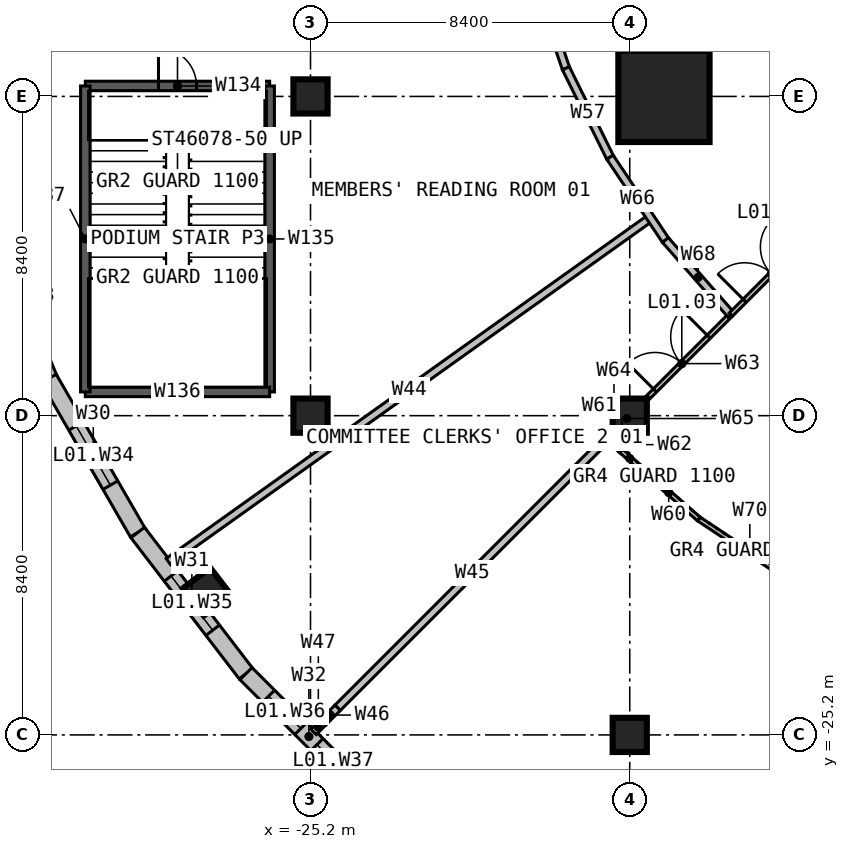
"""IFC4 building model, lengths in metres.
Left out: names, types, materials, properties, quantities, classifications, styles, units other than length and angle.
Written with IfcOpenShell. Run it as: python <this file> out.ifc"""

import sys

from ifc_helpers import new_model, si_unit, direction, frame, frame_2d, origin, origin_2d, place, context, subcontext, project, spatial, rectangle, extrude, element, fill, save


model = new_model("IFC4")
c1 = context("Model", 3, precision=1e-05, world=origin(), true_north=direction((0.0, 1.0)))
c2 = subcontext(c1, "Body", "Model", "MODEL_VIEW")
j1 = project(units=[si_unit("LENGTHUNIT", "METRE"), si_unit("PLANEANGLEUNIT", "RADIAN")], contexts=[c1])
p1 = place(None, origin())
s1 = spatial("IfcSite", under=j1, at=p1, CompositionType="ELEMENT")
p2 = place(p1, origin())
s2 = spatial("IfcBuilding", under=s1, at=p2, CompositionType="ELEMENT")
p3 = place(p2, frame((0.0, 0.0, 6.0)))
s3 = spatial("IfcBuildingStorey", under=s2, at=p3, CompositionType="ELEMENT", Elevation=6.0)
for number, where, z_axis, x_axis in (
    (1, (-25.2, -16.8, 0.0), (0.0, 0.0, 1.0), (1.0, 0.0, 0.0)),
    (2, (-25.2, -8.4, 0.0), (0.0, 0.0, 1.0), (1.0, 0.0, 0.0)),
    (3, (-16.8, -25.2, 0.0), (0.0, 0.0, 1.0), (1.0, 0.0, 0.0)),
    (4, (-16.8, -16.8, 0.0), (0.0, 0.0, 1.0), (1.0, 0.0, 0.0)),
):
    element("IfcColumn", number, at=place(p3, frame(where, z_axis=z_axis, x_axis=x_axis)), inside=s3, PredefinedType="COLUMN", context=c2, shape_type="SweptSolid", body=[
        extrude(rectangle(XDim=0.9, YDim=0.9, at=origin_2d()), origin(), (0.0, 0.0, 1.0), 5.0),
    ])
p4 = place(p3, frame((-15.9, -8.4, 0.0), z_axis=(0.0, 0.0, 1.0), x_axis=(1.0, 0.0, 0.0)))
e5 = element("IfcColumn", 5, at=p4, inside=s3, PredefinedType="COLUMN", context=c2, shape_type="SweptSolid", body=[
    extrude(rectangle(XDim=2.4, YDim=2.4, at=origin_2d()), origin(), (0.0, 0.0, 1.0), 5.0),
])
for number, where, z_axis, x_axis in (
    (6, (-32.521, -13.47, 0.0), (0.0, 0.0, 1.0), (-0.924, -0.383, 0.0)),
    (7, (-27.926, -21.428, 0.0), (0.0, 0.0, 1.0), (-0.793, -0.609, 0.0)),
):
    element("IfcColumn", number, at=place(p3, frame(where, z_axis=z_axis, x_axis=x_axis)), inside=s3, PredefinedType="COLUMN", context=c2, shape_type="SweptSolid", body=[
        extrude(rectangle(XDim=0.9, YDim=0.9, at=origin_2d()), origin(), (0.0, 0.0, 1.0), 5.0),
    ])
p5 = place(p3, frame((-33.876, -11.5, 0.0), z_axis=(0.0, 0.0, 1.0), x_axis=(0.382669718086, -0.923885213032, 0.0)))
e8 = element("IfcWall", 8, at=p5, inside=s3, PredefinedType="SOLIDWALL", context=c2, shape_type="SweptSolid", body=[
    extrude(rectangle(XDim=4.68, YDim=0.45, at=frame_2d((2.34, 0.0))), origin(), (0.0, 0.0, 1.0), 4.7),
])
p6 = place(p5, frame((1.44, 0.0, 0.9)))
e9 = element("IfcOpeningElement", 9, at=p6, cuts=e8, PredefinedType="OPENING", context=c2, shape_type="SweptSolid", body=[
    extrude(rectangle(XDim=1.8, YDim=2.4, at=frame_2d((0.9, 1.2))), frame((0.0, 0.235, 0.0), z_axis=(0.0, -1.0, 0.0), x_axis=(1.0, 0.0, 0.0)), (0.0, 0.0, 1.0), 0.47),
])
p7 = place(p3, frame((-32.086, -15.823, 0.0), z_axis=(0.0, 0.0, 1.0), x_axis=(0.500022025083, -0.866012687223, 0.0)))
e10 = element("IfcWall", 10, at=p7, inside=s3, PredefinedType="SOLIDWALL", context=c2, shape_type="SweptSolid", body=[
    extrude(rectangle(XDim=4.679, YDim=0.45, at=frame_2d((2.34, 0.0))), origin(), (0.0, 0.0, 1.0), 4.7),
])
p8 = place(p7, frame((1.44, 0.0, 0.9)))
e11 = element("IfcOpeningElement", 11, at=p8, cuts=e10, PredefinedType="OPENING", context=c2, shape_type="SweptSolid", body=[
    extrude(rectangle(XDim=1.8, YDim=2.4, at=frame_2d((0.9, 1.2))), frame((0.0, 0.235, 0.0), z_axis=(0.0, -1.0, 0.0), x_axis=(1.0, 0.0, 0.0)), (0.0, 0.0, 1.0), 0.47),
])
p9 = place(p3, frame((-29.746, -19.875, 0.0), z_axis=(0.0, 0.0, 1.0), x_axis=(0.608769916927, -0.79334682721, 0.0)))
e12 = element("IfcWall", 12, at=p9, inside=s3, PredefinedType="SOLIDWALL", context=c2, shape_type="SweptSolid", body=[
    extrude(rectangle(XDim=4.68, YDim=0.45, at=frame_2d((2.34, 0.0))), origin(), (0.0, 0.0, 1.0), 4.7),
])
p10 = place(p9, frame((1.44, 0.0, 0.9)))
e13 = element("IfcOpeningElement", 13, at=p10, cuts=e12, PredefinedType="OPENING", context=c2, shape_type="SweptSolid", body=[
    extrude(rectangle(XDim=1.8, YDim=2.4, at=frame_2d((0.9, 1.2))), frame((0.0, 0.235, 0.0), z_axis=(0.0, -1.0, 0.0), x_axis=(1.0, 0.0, 0.0)), (0.0, 0.0, 1.0), 0.47),
])
p11 = place(p3, frame((-26.897, -23.588, 0.0), z_axis=(0.0, 0.0, 1.0), x_axis=(0.707106781187, -0.707106781187, 0.0)))
e14 = element("IfcWall", 14, at=p11, inside=s3, PredefinedType="SOLIDWALL", context=c2, shape_type="SweptSolid", body=[
    extrude(rectangle(XDim=4.679, YDim=0.45, at=frame_2d((2.34, 0.0))), origin(), (0.0, 0.0, 1.0), 4.7),
])
p12 = place(p11, frame((0.84, 0.0, 0.9)))
e15 = element("IfcOpeningElement", 15, at=p12, cuts=e14, PredefinedType="OPENING", context=c2, shape_type="SweptSolid", body=[
    extrude(rectangle(XDim=1.2, YDim=2.4, at=frame_2d((0.6, 1.2))), frame((0.0, 0.235, 0.0), z_axis=(0.0, -1.0, 0.0), x_axis=(1.0, 0.0, 0.0)), (0.0, 0.0, 1.0), 0.47),
])
p13 = place(p11, frame((2.64, 0.0, 0.9)))
e16 = element("IfcOpeningElement", 16, at=p13, cuts=e14, PredefinedType="OPENING", context=c2, shape_type="SweptSolid", body=[
    extrude(rectangle(XDim=1.2, YDim=2.4, at=frame_2d((0.6, 1.2))), frame((0.0, 0.235, 0.0), z_axis=(0.0, -1.0, 0.0), x_axis=(1.0, 0.0, 0.0)), (0.0, 0.0, 1.0), 0.47),
])
p14 = place(p3, frame((-31.125, -8.125, 0.0), z_axis=(0.0, 0.0, 1.0), x_axis=(1.0, 0.0, 0.0)))
e17 = element("IfcWall", 17, at=p14, inside=s3, PredefinedType="SOLIDWALL", context=c2, shape_type="SweptSolid", body=[
    extrude(rectangle(XDim=4.85, YDim=0.25, at=frame_2d((2.425, 0.0))), origin(), (0.0, 0.0, 1.0), 5.0),
])
p15 = place(p14, frame((1.925, 0.0, 0.0)))
e18 = element("IfcOpeningElement", 18, at=p15, cuts=e17, PredefinedType="OPENING", context=c2, shape_type="SweptSolid", body=[
    extrude(rectangle(XDim=1.0, YDim=2.2, at=frame_2d((0.5, 1.1))), frame((0.0, 0.135, 0.0), z_axis=(0.0, -1.0, 0.0), x_axis=(1.0, 0.0, 0.0)), (0.0, 0.0, 1.0), 0.27),
])
p16 = place(p3, frame((-26.275, -8.125, 0.0), z_axis=(0.0, 0.0, 1.0), x_axis=(0.0, -1.0, 0.0)))
e19 = element("IfcWall", 19, at=p16, inside=s3, PredefinedType="SOLIDWALL", context=c2, shape_type="SweptSolid", body=[
    extrude(rectangle(XDim=8.05, YDim=0.25, at=frame_2d((4.025, 0.0))), origin(), (0.0, 0.0, 1.0), 5.0),
])
p17 = place(p3, frame((-26.275, -16.175, 0.0), z_axis=(0.0, 0.0, 1.0), x_axis=(-1.0, 0.0, 0.0)))
e20 = element("IfcWall", 20, at=p17, inside=s3, PredefinedType="SOLIDWALL", context=c2, shape_type="SweptSolid", body=[
    extrude(rectangle(XDim=4.85, YDim=0.25, at=frame_2d((2.425, 0.0))), origin(), (0.0, 0.0, 1.0), 5.0),
])
p18 = place(p3, frame((-31.125, -16.175, 0.0), z_axis=(0.0, 0.0, 1.0), x_axis=(0.0, 1.0, 0.0)))
e21 = element("IfcWall", 21, at=p18, inside=s3, PredefinedType="SOLIDWALL", context=c2, shape_type="SweptSolid", body=[
    extrude(rectangle(XDim=8.05, YDim=0.25, at=frame_2d((4.025, 0.0))), origin(), (0.0, 0.0, 1.0), 5.0),
])
p19 = place(p3, frame((-28.94, -20.64, 0.0), z_axis=(0.0, 0.0, 1.0), x_axis=(0.814258557322, 0.580502370217, 0.0)))
e22 = element("IfcWall", 22, at=p19, inside=s3, PredefinedType="PARTITIONING", context=c2, shape_type="SweptSolid", body=[
    extrude(rectangle(XDim=15.572, YDim=0.2, at=frame_2d((7.786, 0.0))), origin(), (0.0, 0.0, 1.0), 4.7),
])
p20 = place(p3, frame((-24.486, -24.486, 0.0), z_axis=(0.0, 0.0, 1.0), x_axis=(0.707106781187, 0.707106781187, 0.0)))
e23 = element("IfcWall", 23, at=p20, inside=s3, PredefinedType="PARTITIONING", context=c2, shape_type="SweptSolid", body=[
    extrude(rectangle(XDim=10.022, YDim=0.2, at=frame_2d((5.011, 0.0))), origin(), (0.0, 0.0, 1.0), 4.7),
])
p21 = place(p3, frame((-24.868, -24.868, 0.0), z_axis=(0.0, 0.0, 1.0), x_axis=(0.707106781187, 0.707106781187, 0.0)))
e24 = element("IfcWall", 24, at=p21, inside=s3, PredefinedType="PARTITIONING", context=c2, shape_type="SweptSolid", body=[
    extrude(rectangle(XDim=0.54, YDim=0.2, at=frame_2d((0.27, 0.0))), origin(), (0.0, 0.0, 1.0), 4.3),
])
p22 = place(p3, frame((-25.12, -25.12, 0.0), z_axis=(0.0, 0.0, 1.0), x_axis=(0.707106781187, 0.707106781187, 0.0)))
e25 = element("IfcWall", 25, at=p22, inside=s3, PredefinedType="PARTITIONING", context=c2, shape_type="SweptSolid", body=[
    extrude(rectangle(XDim=0.356, YDim=0.2, at=frame_2d((0.178, 0.0))), origin(), (0.0, 0.0, 1.0), 4.7),
])
p23 = place(p3, frame((-19.32, -5.18, 0.0), z_axis=(0.0, 0.0, 1.0), x_axis=(0.320839411875, -0.947133608203, 0.0)))
e26 = element("IfcWall", 26, at=p23, inside=s3, PredefinedType="PARTITIONING", context=c2, shape_type="SweptSolid", body=[
    extrude(rectangle(XDim=2.618, YDim=0.2, at=frame_2d((1.309, 0.0))), origin(), (0.0, 0.0, 1.0), 4.7),
])
p24 = place(p3, frame((-18.48, -7.66, 0.0), z_axis=(0.0, 0.0, 1.0), x_axis=(0.444107479291, -0.895973519049, 0.0)))
e27 = element("IfcWall", 27, at=p24, inside=s3, PredefinedType="PARTITIONING", context=c2, shape_type="SweptSolid", body=[
    extrude(rectangle(XDim=2.612, YDim=0.2, at=frame_2d((1.306, 0.0))), origin(), (0.0, 0.0, 1.0), 4.7),
])
p25 = place(p3, frame((-16.57, -18.127, 0.0), z_axis=(0.0, 0.0, 1.0), x_axis=(0.752226011438, -0.658905173538, 0.0)))
e28 = element("IfcWall", 28, at=p25, inside=s3, PredefinedType="PARTITIONING", context=c2, shape_type="SweptSolid", body=[
    extrude(rectangle(XDim=2.114, YDim=0.12, at=frame_2d((1.057, 0.0))), origin(), (0.0, 0.0, 1.0), 4.7),
])
p26 = place(p3, frame((-17.03, -17.724, 0.0), z_axis=(0.0, 0.0, 1.0), x_axis=(0.752081905539, -0.65906965289, 0.0)))
e29 = element("IfcWall", 29, at=p26, inside=s3, PredefinedType="PARTITIONING", context=c2, shape_type="SweptSolid", body=[
    extrude(rectangle(XDim=0.612, YDim=0.12, at=frame_2d((0.306, 0.0))), origin(), (0.0, 0.0, 1.0), 4.3),
])
p27 = place(p3, frame((-17.4, -17.4, 0.0), z_axis=(0.0, 0.0, 1.0), x_axis=(0.751992181934, -0.659172024824, 0.0)))
e30 = element("IfcWall", 30, at=p27, inside=s3, PredefinedType="PARTITIONING", context=c2, shape_type="SweptSolid", body=[
    extrude(rectangle(XDim=0.492, YDim=0.12, at=frame_2d((0.246, 0.0))), origin(), (0.0, 0.0, 1.0), 4.7),
])
p28 = place(p3, frame((-16.72, -16.72, 0.0), z_axis=(0.0, 0.0, 1.0), x_axis=(0.707106781187, 0.707106781187, 0.0)))
e31 = element("IfcWall", 31, at=p28, inside=s3, PredefinedType="PARTITIONING", context=c2, shape_type="SweptSolid", body=[
    extrude(rectangle(XDim=3.649, YDim=0.12, at=frame_2d((1.824, 0.0))), origin(), (0.0, 0.0, 1.0), 4.7),
])
p29 = place(p28, frame((0.824, 0.0, 0.0)))
e32 = element("IfcOpeningElement", 32, at=p29, cuts=e31, PredefinedType="OPENING", context=c2, shape_type="SweptSolid", body=[
    extrude(rectangle(XDim=2.0, YDim=2.4, at=frame_2d((1.0, 1.2))), frame((0.0, 0.07, 0.0), z_axis=(0.0, -1.0, 0.0), x_axis=(1.0, 0.0, 0.0)), (0.0, 0.0, 1.0), 0.14),
])
p30 = place(p3, frame((-17.4, -17.4, 0.0), z_axis=(0.0, 0.0, 1.0), x_axis=(0.707106781187, 0.707106781187, 0.0)))
e33 = element("IfcWall", 33, at=p30, inside=s3, PredefinedType="PARTITIONING", context=c2, shape_type="SweptSolid", body=[
    extrude(rectangle(XDim=0.523, YDim=0.12, at=frame_2d((0.262, 0.0))), origin(), (0.0, 0.0, 1.0), 4.7),
])
p31 = place(p3, frame((-17.03, -17.03, 0.0), z_axis=(0.0, 0.0, 1.0), x_axis=(0.707106781187, 0.707106781187, 0.0)))
e34 = element("IfcWall", 34, at=p31, inside=s3, PredefinedType="PARTITIONING", context=c2, shape_type="SweptSolid", body=[
    extrude(rectangle(XDim=0.438, YDim=0.12, at=frame_2d((0.219, 0.0))), origin(), (0.0, 0.0, 1.0), 4.3),
])
p32 = place(p3, frame((-17.32, -10.0, 0.0), z_axis=(0.0, 0.0, 1.0), x_axis=(0.556459812229, -0.83087452565, 0.0)))
e35 = element("IfcWall", 35, at=p32, inside=s3, PredefinedType="PARTITIONING", context=c2, shape_type="SweptSolid", body=[
    extrude(rectangle(XDim=2.624, YDim=0.2, at=frame_2d((1.312, 0.0))), origin(), (0.0, 0.0, 1.0), 4.7),
])
p33 = place(p3, frame((-15.86, -12.18, 0.0), z_axis=(0.0, 0.0, 1.0), x_axis=(0.659643857667, -0.751578326618, 0.0)))
e36 = element("IfcWall", 36, at=p33, inside=s3, PredefinedType="PARTITIONING", context=c2, shape_type="SweptSolid", body=[
    extrude(rectangle(XDim=2.608, YDim=0.2, at=frame_2d((1.304, 0.0))), origin(), (0.0, 0.0, 1.0), 4.7),
])
p34 = place(p3, frame((-14.98, -19.52, 0.0), z_axis=(0.0, 0.0, 1.0), x_axis=(0.832994734858, -0.553280915719, 0.0)))
e37 = element("IfcWall", 37, at=p34, inside=s3, PredefinedType="PARTITIONING", context=c2, shape_type="SweptSolid", body=[
    extrude(rectangle(XDim=3.217, YDim=0.12, at=frame_2d((1.609, 0.0))), origin(), (0.0, 0.0, 1.0), 4.7),
])
p35 = place(p3, frame((-14.14, -14.14, 0.0), z_axis=(0.0, 0.0, 1.0), x_axis=(0.707106781187, 0.707106781187, 0.0)))
e38 = element("IfcWall", 38, at=p35, inside=s3, PredefinedType="PARTITIONING", context=c2, shape_type="SweptSolid", body=[
    extrude(rectangle(XDim=3.026, YDim=0.12, at=frame_2d((1.513, 0.0))), origin(), (0.0, 0.0, 1.0), 4.7),
])
p36 = place(p35, frame((0.513, 0.0, 0.0)))
e39 = element("IfcOpeningElement", 39, at=p36, cuts=e38, PredefinedType="OPENING", context=c2, shape_type="SweptSolid", body=[
    extrude(rectangle(XDim=2.0, YDim=2.4, at=frame_2d((1.0, 1.2))), frame((0.0, 0.07, 0.0), z_axis=(0.0, -1.0, 0.0), x_axis=(1.0, 0.0, 0.0)), (0.0, 0.0, 1.0), 0.14),
])
p37 = place(p8, origin())
e40 = element("IfcWindow", 40, at=p37, inside=s3, PartitioningType="SINGLE_PANEL", PredefinedType="WINDOW", context=c2, shape_type="SweptSolid", body=[
    extrude(rectangle(XDim=1.8, YDim=2.4, at=frame_2d((0.9, 1.2))), frame((0.0, 0.03, 0.0), z_axis=(0.0, -1.0, 0.0), x_axis=(1.0, 0.0, 0.0)), (0.0, 0.0, 1.0), 0.06),
])
fill(e11, e40)
p38 = place(p10, origin())
e41 = element("IfcWindow", 41, at=p38, inside=s3, PartitioningType="SINGLE_PANEL", PredefinedType="WINDOW", context=c2, shape_type="SweptSolid", body=[
    extrude(rectangle(XDim=1.8, YDim=2.4, at=frame_2d((0.9, 1.2))), frame((0.0, 0.03, 0.0), z_axis=(0.0, -1.0, 0.0), x_axis=(1.0, 0.0, 0.0)), (0.0, 0.0, 1.0), 0.06),
])
fill(e13, e41)
p39 = place(p12, origin())
e42 = element("IfcWindow", 42, at=p39, inside=s3, PartitioningType="SINGLE_PANEL", PredefinedType="WINDOW", context=c2, shape_type="SweptSolid", body=[
    extrude(rectangle(XDim=1.2, YDim=2.4, at=frame_2d((0.6, 1.2))), frame((0.0, 0.03, 0.0), z_axis=(0.0, -1.0, 0.0), x_axis=(1.0, 0.0, 0.0)), (0.0, 0.0, 1.0), 0.06),
])
fill(e15, e42)
p40 = place(p13, origin())
e43 = element("IfcWindow", 43, at=p40, inside=s3, PartitioningType="SINGLE_PANEL", PredefinedType="WINDOW", context=c2, shape_type="SweptSolid", body=[
    extrude(rectangle(XDim=1.2, YDim=2.4, at=frame_2d((0.6, 1.2))), frame((0.0, 0.03, 0.0), z_axis=(0.0, -1.0, 0.0), x_axis=(1.0, 0.0, 0.0)), (0.0, 0.0, 1.0), 0.06),
])
fill(e16, e43)
p41 = place(p15, origin())
e44 = element("IfcDoor", 44, at=p41, inside=s3, OperationType="SINGLE_SWING_LEFT", PredefinedType="DOOR", context=c2, shape_type="SweptSolid", body=[
    extrude(rectangle(XDim=1.0, YDim=2.2, at=frame_2d((0.5, 1.1))), frame((0.0, 0.025, 0.0), z_axis=(0.0, -1.0, 0.0), x_axis=(1.0, 0.0, 0.0)), (0.0, 0.0, 1.0), 0.05),
])
fill(e18, e44)
p42 = place(p29, origin())
e45 = element("IfcDoor", 45, at=p42, inside=s3, OperationType="DOUBLE_DOOR_SINGLE_SWING", PredefinedType="DOOR", context=c2, shape_type="SweptSolid", body=[
    extrude(rectangle(XDim=2.0, YDim=2.4, at=frame_2d((1.0, 1.2))), frame((0.0, 0.025, 0.0), z_axis=(0.0, -1.0, 0.0), x_axis=(1.0, 0.0, 0.0)), (0.0, 0.0, 1.0), 0.05),
])
fill(e32, e45)
p43 = place(p36, origin())
e46 = element("IfcDoor", 46, at=p43, inside=s3, OperationType="DOUBLE_DOOR_SINGLE_SWING", PredefinedType="DOOR", context=c2, shape_type="SweptSolid", body=[
    extrude(rectangle(XDim=2.0, YDim=2.4, at=frame_2d((1.0, 1.2))), frame((0.0, 0.025, 0.0), z_axis=(0.0, -1.0, 0.0), x_axis=(1.0, 0.0, 0.0)), (0.0, 0.0, 1.0), 0.05),
])
fill(e39, e46)
save(model, sys.argv[1])
